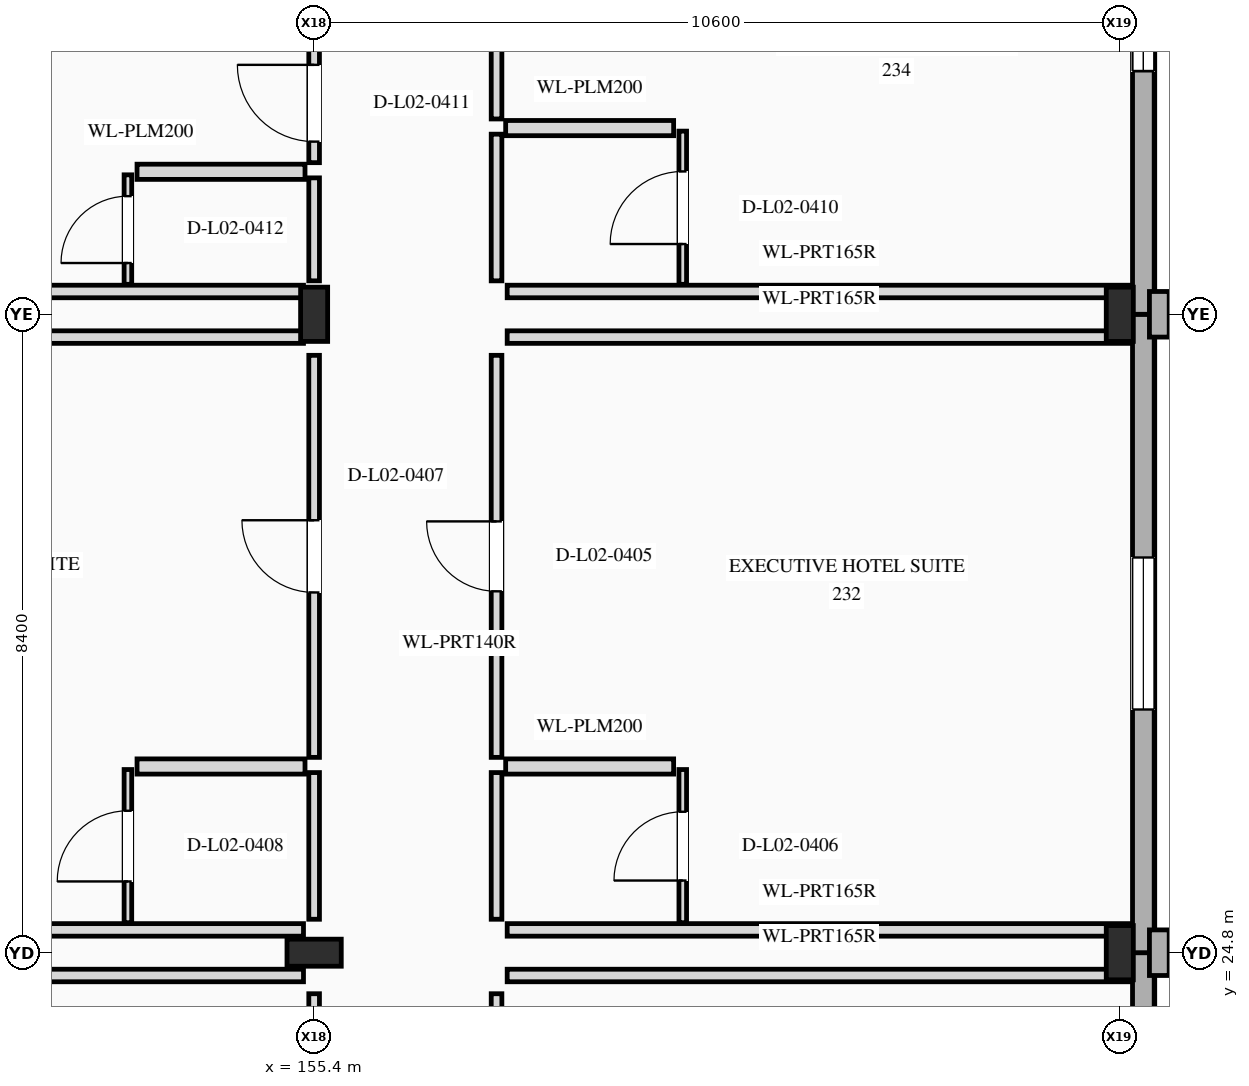
"""IFC4 building model, lengths in metres.
Left out: names, types, materials, properties, quantities, classifications, styles, units other than length and angle.
Written with IfcOpenShell. Run it as: python <this file> out.ifc"""

import sys

from ifc_helpers import new_model, si_unit, direction, frame, frame_2d, origin, origin_2d, place, context, subcontext, project, spatial, rectangle, i_section, extrude, element, fill, save


model = new_model("IFC4")
c1 = context("Model", 3, precision=1e-05, world=origin(), true_north=direction((0.0, 1.0)))
c2 = subcontext(c1, "Body", "Model", "MODEL_VIEW")
j1 = project(units=[si_unit("LENGTHUNIT", "METRE"), si_unit("PLANEANGLEUNIT", "RADIAN")], contexts=[c1])
p1 = place(None, origin())
s1 = spatial("IfcSite", under=j1, at=p1, CompositionType="ELEMENT")
p2 = place(p1, origin())
s2 = spatial("IfcBuilding", under=s1, at=p2, CompositionType="ELEMENT")
p3 = place(p2, frame((0.0, 0.0, 10.8)))
s3 = spatial("IfcBuildingStorey", under=s2, at=p3, CompositionType="ELEMENT", Elevation=10.8)
for number, where, z_axis, x_axis in (
    (1, (155.4, 24.8, 0.0), (0.0, 0.0, 1.0), (0.0, 1.0, 0.0)),
    (2, (155.4, 33.2, 0.0), (0.0, 0.0, 1.0), (1.0, 0.0, 0.0)),
    (3, (166.0, 24.8, 0.0), (0.0, 0.0, 1.0), (1.0, 0.0, 0.0)),
    (4, (166.0, 33.2, 0.0), (0.0, 0.0, 1.0), (1.0, 0.0, 0.0)),
):
    element("IfcColumn", number, at=place(p3, frame(where, z_axis=z_axis, x_axis=x_axis)), inside=s3, PredefinedType="COLUMN", context=c2, shape_type="SweptSolid", body=[
        extrude(i_section(OverallWidth=0.356, OverallDepth=0.714, WebThickness=0.019, FlangeThickness=0.034, at=origin_2d()), origin(), (0.0, 0.0, 1.0), 4.8),
    ])
p4 = place(p3, frame((166.31, 18.8, 0.0), z_axis=(0.0, 0.0, 1.0), x_axis=(0.0, 1.0, 0.0)))
e5 = element("IfcWall", 5, at=p4, inside=s3, PredefinedType="STANDARD", context=c2, shape_type="SweptSolid", body=[
    extrude(rectangle(XDim=6.0, YDim=0.285, at=frame_2d((3.0, 0.0))), origin(), (0.0, 0.0, 1.0), 4.8),
])
p5 = place(p4, frame((2.0, 0.0, 0.85)))
e6 = element("IfcOpeningElement", 6, at=p5, cuts=e5, PredefinedType="OPENING", context=c2, shape_type="SweptSolid", body=[
    extrude(rectangle(XDim=2.0, YDim=1.65, at=frame_2d((1.0, 0.825))), frame((0.0, 0.152, 0.0), z_axis=(0.0, -1.0, 0.0), x_axis=(1.0, 0.0, 0.0)), (0.0, 0.0, 1.0), 0.305),
])
p6 = place(p3, frame((166.31, 24.8, 0.0), z_axis=(0.0, 0.0, 1.0), x_axis=(0.0, 1.0, 0.0)))
e7 = element("IfcWall", 7, at=p6, inside=s3, PredefinedType="STANDARD", context=c2, shape_type="SweptSolid", body=[
    extrude(rectangle(XDim=8.4, YDim=0.285, at=frame_2d((4.2, 0.0))), origin(), (0.0, 0.0, 1.0), 4.8),
])
p7 = place(p6, frame((3.2, 0.0, 0.85)))
e8 = element("IfcOpeningElement", 8, at=p7, cuts=e7, PredefinedType="OPENING", context=c2, shape_type="SweptSolid", body=[
    extrude(rectangle(XDim=2.0, YDim=1.65, at=frame_2d((1.0, 0.825))), frame((0.0, 0.152, 0.0), z_axis=(0.0, -1.0, 0.0), x_axis=(1.0, 0.0, 0.0)), (0.0, 0.0, 1.0), 0.305),
])
p8 = place(p3, frame((166.52, 24.5, 0.0), z_axis=(0.0, 0.0, 1.0), x_axis=(0.0, 1.0, 0.0)))
e9 = element("IfcWall", 9, at=p8, inside=s3, PredefinedType="ELEMENTEDWALL", context=c2, shape_type="SweptSolid", body=[
    extrude(rectangle(XDim=0.6, YDim=0.26, at=frame_2d((0.3, 0.0))), origin(), (0.0, 0.0, 1.0), 4.8),
])
p9 = place(p3, frame((166.31, 33.2, 0.0), z_axis=(0.0, 0.0, 1.0), x_axis=(0.0, 1.0, 0.0)))
e10 = element("IfcWall", 10, at=p9, inside=s3, PredefinedType="STANDARD", context=c2, shape_type="SweptSolid", body=[
    extrude(rectangle(XDim=8.4, YDim=0.285, at=frame_2d((4.2, 0.0))), origin(), (0.0, 0.0, 1.0), 4.8),
])
p10 = place(p9, frame((3.2, 0.0, 0.85)))
e11 = element("IfcOpeningElement", 11, at=p10, cuts=e10, PredefinedType="OPENING", context=c2, shape_type="SweptSolid", body=[
    extrude(rectangle(XDim=2.0, YDim=1.65, at=frame_2d((1.0, 0.825))), frame((0.0, 0.152, 0.0), z_axis=(0.0, -1.0, 0.0), x_axis=(1.0, 0.0, 0.0)), (0.0, 0.0, 1.0), 0.305),
])
p11 = place(p3, frame((166.52, 32.9, 0.0), z_axis=(0.0, 0.0, 1.0), x_axis=(0.0, 1.0, 0.0)))
e12 = element("IfcWall", 12, at=p11, inside=s3, PredefinedType="ELEMENTEDWALL", context=c2, shape_type="SweptSolid", body=[
    extrude(rectangle(XDim=0.6, YDim=0.26, at=frame_2d((0.3, 0.0))), origin(), (0.0, 0.0, 1.0), 4.8),
])
p12 = place(p3, frame((157.8, 21.37, 0.0), z_axis=(0.0, 0.0, 1.0), x_axis=(0.0, 1.0, 0.0)))
e13 = element("IfcWall", 13, at=p12, inside=s3, PredefinedType="PARTITIONING", context=c2, shape_type="SweptSolid", body=[
    extrude(rectangle(XDim=2.89, YDim=0.14, at=frame_2d((1.445, 0.0))), origin(), (0.0, 0.0, 1.0), 4.033),
])
p13 = place(p12, frame((0.925, 0.0, 0.0)))
e14 = element("IfcOpeningElement", 14, at=p13, cuts=e13, PredefinedType="OPENING", context=c2, shape_type="SweptSolid", body=[
    extrude(rectangle(XDim=1.04, YDim=2.4, at=frame_2d((0.52, 1.2))), frame((0.0, 0.08, 0.0), z_axis=(0.0, -1.0, 0.0), x_axis=(1.0, 0.0, 0.0)), (0.0, 0.0, 1.0), 0.16),
])
p14 = place(p3, frame((157.94, 24.5, 0.0), z_axis=(0.0, 0.0, 1.0), x_axis=(1.0, 0.0, 0.0)))
e15 = element("IfcWall", 15, at=p14, inside=s3, PredefinedType="PARTITIONING", context=c2, shape_type="SweptSolid", body=[
    extrude(rectangle(XDim=8.213, YDim=0.165, at=frame_2d((4.106, 0.0))), origin(), (0.0, 0.0, 1.0), 3.865),
])
p15 = place(p3, frame((155.4, 21.37, 0.0), z_axis=(0.0, 0.0, 1.0), x_axis=(0.0, 1.0, 0.0)))
e16 = element("IfcWall", 16, at=p15, inside=s3, PredefinedType="PARTITIONING", context=c2, shape_type="SweptSolid", body=[
    extrude(rectangle(XDim=2.89, YDim=0.14, at=frame_2d((1.445, 0.0))), origin(), (0.0, 0.0, 1.0), 3.949),
])
p16 = place(p15, frame((0.91, 0.0, 0.0)))
e17 = element("IfcOpeningElement", 17, at=p16, cuts=e16, PredefinedType="OPENING", context=c2, shape_type="SweptSolid", body=[
    extrude(rectangle(XDim=1.07, YDim=2.4, at=frame_2d((0.535, 1.2))), frame((0.0, 0.08, 0.0), z_axis=(0.0, -1.0, 0.0), x_axis=(1.0, 0.0, 0.0)), (0.0, 0.0, 1.0), 0.16),
])
p17 = place(p3, frame((147.048, 24.5, 0.0), z_axis=(0.0, 0.0, 1.0), x_axis=(1.0, 0.0, 0.0)))
e18 = element("IfcWall", 18, at=p17, inside=s3, PredefinedType="PARTITIONING", context=c2, shape_type="SweptSolid", body=[
    extrude(rectangle(XDim=8.212, YDim=0.165, at=frame_2d((4.106, 0.0))), origin(), (0.0, 0.0, 1.0), 3.888),
])
p18 = place(p3, frame((157.8, 25.24, 0.0), z_axis=(0.0, 0.0, 1.0), x_axis=(0.0, 1.0, 0.0)))
e19 = element("IfcWall", 19, at=p18, inside=s3, PredefinedType="PARTITIONING", context=c2, shape_type="SweptSolid", body=[
    extrude(rectangle(XDim=1.93, YDim=0.14, at=frame_2d((0.965, 0.0))), origin(), (0.0, 0.0, 1.0), 4.028),
])
p19 = place(p3, frame((157.8, 27.37, 0.0), z_axis=(0.0, 0.0, 1.0), x_axis=(0.0, 1.0, 0.0)))
e20 = element("IfcWall", 20, at=p19, inside=s3, PredefinedType="PARTITIONING", context=c2, shape_type="SweptSolid", body=[
    extrude(rectangle(XDim=5.29, YDim=0.14, at=frame_2d((2.645, 0.0))), origin(), (0.0, 0.0, 1.0), 4.028),
])
p20 = place(p19, frame((2.185, 0.0, 0.0)))
e21 = element("IfcOpeningElement", 21, at=p20, cuts=e20, PredefinedType="OPENING", context=c2, shape_type="SweptSolid", body=[
    extrude(rectangle(XDim=0.92, YDim=2.15, at=frame_2d((0.46, 1.075))), frame((0.0, 0.08, 0.0), z_axis=(0.0, -1.0, 0.0), x_axis=(1.0, 0.0, 0.0)), (0.0, 0.0, 1.0), 0.16),
])
for number, where, z_axis, x_axis in (
    (22, (157.94, 25.1, 0.0), (0.0, 0.0, 1.0), (1.0, 0.0, 0.0)),
    (23, (157.94, 32.9, 0.0), (0.0, 0.0, 1.0), (1.0, 0.0, 0.0)),
):
    element("IfcWall", number, at=place(p3, frame(where, z_axis=z_axis, x_axis=x_axis)), inside=s3, PredefinedType="PARTITIONING", context=c2, shape_type="SweptSolid", body=[
        extrude(rectangle(XDim=8.213, YDim=0.165, at=frame_2d((4.106, 0.0))), origin(), (0.0, 0.0, 1.0), 3.865),
    ])
p21 = place(p3, frame((157.92, 27.25, 0.0), z_axis=(0.0, 0.0, 1.0), x_axis=(1.0, 0.0, 0.0)))
e24 = element("IfcWall", 24, at=p21, inside=s3, PredefinedType="PLUMBINGWALL", context=c2, shape_type="SweptSolid", body=[
    extrude(rectangle(XDim=2.21, YDim=0.2, at=frame_2d((1.105, 0.0))), origin(), (0.0, 0.0, 1.0), 4.475),
])
p22 = place(p3, frame((160.25, 25.195, 0.0), z_axis=(0.0, 0.0, 1.0), x_axis=(0.0, 1.0, 0.0)))
e25 = element("IfcWall", 25, at=p22, inside=s3, PredefinedType="PARTITIONING", context=c2, shape_type="SweptSolid", body=[
    extrude(rectangle(XDim=2.015, YDim=0.1, at=frame_2d((1.008, 0.0))), origin(), (0.0, 0.0, 1.0), 4.028),
])
p23 = place(p22, frame((0.555, 0.0, 0.0)))
e26 = element("IfcOpeningElement", 26, at=p23, cuts=e25, PredefinedType="OPENING", context=c2, shape_type="SweptSolid", body=[
    extrude(rectangle(XDim=0.905, YDim=2.1, at=frame_2d((0.453, 1.05))), frame((0.0, 0.06, 0.0), z_axis=(0.0, -1.0, 0.0), x_axis=(1.0, 0.0, 0.0)), (0.0, 0.0, 1.0), 0.12),
])
p24 = place(p3, frame((155.4, 25.24, 0.0), z_axis=(0.0, 0.0, 1.0), x_axis=(0.0, 1.0, 0.0)))
e27 = element("IfcWall", 27, at=p24, inside=s3, PredefinedType="PARTITIONING", context=c2, shape_type="SweptSolid", body=[
    extrude(rectangle(XDim=1.93, YDim=0.14, at=frame_2d((0.965, 0.0))), origin(), (0.0, 0.0, 1.0), 3.949),
])
p25 = place(p3, frame((155.4, 27.37, 0.0), z_axis=(0.0, 0.0, 1.0), x_axis=(0.0, 1.0, 0.0)))
e28 = element("IfcWall", 28, at=p25, inside=s3, PredefinedType="PARTITIONING", context=c2, shape_type="SweptSolid", body=[
    extrude(rectangle(XDim=5.29, YDim=0.14, at=frame_2d((2.645, 0.0))), origin(), (0.0, 0.0, 1.0), 3.949),
])
p26 = place(p25, frame((2.17, 0.0, 0.0)))
e29 = element("IfcOpeningElement", 29, at=p26, cuts=e28, PredefinedType="OPENING", context=c2, shape_type="SweptSolid", body=[
    extrude(rectangle(XDim=0.95, YDim=2.15, at=frame_2d((0.475, 1.075))), frame((0.0, 0.08, 0.0), z_axis=(0.0, -1.0, 0.0), x_axis=(1.0, 0.0, 0.0)), (0.0, 0.0, 1.0), 0.16),
])
for number, where, z_axis, x_axis in (
    (30, (147.048, 25.1, 0.0), (0.0, 0.0, 1.0), (1.0, 0.0, 0.0)),
    (31, (147.048, 32.9, 0.0), (0.0, 0.0, 1.0), (1.0, 0.0, 0.0)),
):
    element("IfcWall", number, at=place(p3, frame(where, z_axis=z_axis, x_axis=x_axis)), inside=s3, PredefinedType="PARTITIONING", context=c2, shape_type="SweptSolid", body=[
        extrude(rectangle(XDim=8.212, YDim=0.165, at=frame_2d((4.106, 0.0))), origin(), (0.0, 0.0, 1.0), 3.888),
    ])
p27 = place(p3, frame((153.07, 27.25, 0.0), z_axis=(0.0, 0.0, 1.0), x_axis=(1.0, 0.0, 0.0)))
e32 = element("IfcWall", 32, at=p27, inside=s3, PredefinedType="PLUMBINGWALL", context=c2, shape_type="SweptSolid", body=[
    extrude(rectangle(XDim=2.21, YDim=0.2, at=frame_2d((1.105, 0.0))), origin(), (0.0, 0.0, 1.0), 4.475),
])
p28 = place(p3, frame((152.95, 25.195, 0.0), z_axis=(0.0, 0.0, 1.0), x_axis=(0.0, 1.0, 0.0)))
e33 = element("IfcWall", 33, at=p28, inside=s3, PredefinedType="PARTITIONING", context=c2, shape_type="SweptSolid", body=[
    extrude(rectangle(XDim=2.015, YDim=0.1, at=frame_2d((1.008, 0.0))), origin(), (0.0, 0.0, 1.0), 4.083),
])
p29 = place(p28, frame((0.543, 0.0, 0.0)))
e34 = element("IfcOpeningElement", 34, at=p29, cuts=e33, PredefinedType="OPENING", context=c2, shape_type="SweptSolid", body=[
    extrude(rectangle(XDim=0.93, YDim=2.14, at=frame_2d((0.465, 1.07))), frame((0.0, 0.06, 0.0), z_axis=(0.0, -1.0, 0.0), x_axis=(1.0, 0.0, 0.0)), (0.0, 0.0, 1.0), 0.12),
])
p30 = place(p3, frame((157.8, 33.64, 0.0), z_axis=(0.0, 0.0, 1.0), x_axis=(0.0, 1.0, 0.0)))
e35 = element("IfcWall", 35, at=p30, inside=s3, PredefinedType="PARTITIONING", context=c2, shape_type="SweptSolid", body=[
    extrude(rectangle(XDim=1.93, YDim=0.14, at=frame_2d((0.965, 0.0))), origin(), (0.0, 0.0, 1.0), 4.475),
])
p31 = place(p3, frame((157.8, 35.77, 0.0), z_axis=(0.0, 0.0, 1.0), x_axis=(0.0, 1.0, 0.0)))
e36 = element("IfcWall", 36, at=p31, inside=s3, PredefinedType="PARTITIONING", context=c2, shape_type="SweptSolid", body=[
    extrude(rectangle(XDim=5.29, YDim=0.14, at=frame_2d((2.645, 0.0))), origin(), (0.0, 0.0, 1.0), 4.475),
])
p32 = place(p31, frame((2.155, 0.0, 0.0)))
e37 = element("IfcOpeningElement", 37, at=p32, cuts=e36, PredefinedType="OPENING", context=c2, shape_type="SweptSolid", body=[
    extrude(rectangle(XDim=0.98, YDim=2.2, at=frame_2d((0.49, 1.1))), frame((0.0, 0.08, 0.0), z_axis=(0.0, -1.0, 0.0), x_axis=(1.0, 0.0, 0.0)), (0.0, 0.0, 1.0), 0.16),
])
p33 = place(p3, frame((157.94, 33.5, 0.0), z_axis=(0.0, 0.0, 1.0), x_axis=(1.0, 0.0, 0.0)))
e38 = element("IfcWall", 38, at=p33, inside=s3, PredefinedType="PARTITIONING", context=c2, shape_type="SweptSolid", body=[
    extrude(rectangle(XDim=8.213, YDim=0.165, at=frame_2d((4.106, 0.0))), origin(), (0.0, 0.0, 1.0), 3.865),
])
p34 = place(p3, frame((157.92, 35.65, 0.0), z_axis=(0.0, 0.0, 1.0), x_axis=(1.0, 0.0, 0.0)))
e39 = element("IfcWall", 39, at=p34, inside=s3, PredefinedType="PLUMBINGWALL", context=c2, shape_type="SweptSolid", body=[
    extrude(rectangle(XDim=2.21, YDim=0.2, at=frame_2d((1.105, 0.0))), origin(), (0.0, 0.0, 1.0), 4.475),
])
p35 = place(p3, frame((160.25, 33.594, 0.0), z_axis=(0.0, 0.0, 1.0), x_axis=(0.0, 1.0, 0.0)))
e40 = element("IfcWall", 40, at=p35, inside=s3, PredefinedType="PARTITIONING", context=c2, shape_type="SweptSolid", body=[
    extrude(rectangle(XDim=2.016, YDim=0.1, at=frame_2d((1.008, 0.0))), origin(), (0.0, 0.0, 1.0), 4.475),
])
p36 = place(p35, frame((0.53, 0.0, 0.0)))
e41 = element("IfcOpeningElement", 41, at=p36, cuts=e40, PredefinedType="OPENING", context=c2, shape_type="SweptSolid", body=[
    extrude(rectangle(XDim=0.955, YDim=2.14, at=frame_2d((0.478, 1.07))), frame((0.0, 0.06, 0.0), z_axis=(0.0, -1.0, 0.0), x_axis=(1.0, 0.0, 0.0)), (0.0, 0.0, 1.0), 0.12),
])
p37 = place(p3, frame((155.4, 33.64, 0.0), z_axis=(0.0, 0.0, 1.0), x_axis=(0.0, 1.0, 0.0)))
e42 = element("IfcWall", 42, at=p37, inside=s3, PredefinedType="PARTITIONING", context=c2, shape_type="SweptSolid", body=[
    extrude(rectangle(XDim=1.355, YDim=0.14, at=frame_2d((0.678, 0.0))), origin(), (0.0, 0.0, 1.0), 3.865),
])
p38 = place(p3, frame((155.4, 35.195, 0.0), z_axis=(0.0, 0.0, 1.0), x_axis=(0.0, 1.0, 0.0)))
e43 = element("IfcWall", 43, at=p38, inside=s3, PredefinedType="PARTITIONING", context=c2, shape_type="SweptSolid", body=[
    extrude(rectangle(XDim=1.565, YDim=0.14, at=frame_2d((0.782, 0.0))), origin(), (0.0, 0.0, 1.0), 3.865),
])
p39 = place(p38, frame((0.277, 0.0, 0.0)))
e44 = element("IfcOpeningElement", 44, at=p39, cuts=e43, PredefinedType="OPENING", context=c2, shape_type="SweptSolid", body=[
    extrude(rectangle(XDim=1.01, YDim=2.2, at=frame_2d((0.505, 1.1))), frame((0.0, 0.08, 0.0), z_axis=(0.0, -1.0, 0.0), x_axis=(1.0, 0.0, 0.0)), (0.0, 0.0, 1.0), 0.16),
])
p40 = place(p3, frame((147.048, 33.5, 0.0), z_axis=(0.0, 0.0, 1.0), x_axis=(1.0, 0.0, 0.0)))
e45 = element("IfcWall", 45, at=p40, inside=s3, PredefinedType="PARTITIONING", context=c2, shape_type="SweptSolid", body=[
    extrude(rectangle(XDim=8.212, YDim=0.165, at=frame_2d((4.106, 0.0))), origin(), (0.0, 0.0, 1.0), 3.888),
])
p41 = place(p3, frame((153.07, 35.075, 0.0), z_axis=(0.0, 0.0, 1.0), x_axis=(1.0, 0.0, 0.0)))
e46 = element("IfcWall", 46, at=p41, inside=s3, PredefinedType="PLUMBINGWALL", context=c2, shape_type="SweptSolid", body=[
    extrude(rectangle(XDim=2.21, YDim=0.2, at=frame_2d((1.105, 0.0))), origin(), (0.0, 0.0, 1.0), 4.475),
])
p42 = place(p3, frame((152.95, 33.594, 0.0), z_axis=(0.0, 0.0, 1.0), x_axis=(0.0, 1.0, 0.0)))
e47 = element("IfcWall", 47, at=p42, inside=s3, PredefinedType="PARTITIONING", context=c2, shape_type="SweptSolid", body=[
    extrude(rectangle(XDim=1.44, YDim=0.1, at=frame_2d((0.72, 0.0))), origin(), (0.0, 0.0, 1.0), 4.475),
])
p43 = place(p42, frame((0.28, 0.0, 0.0)))
e48 = element("IfcOpeningElement", 48, at=p43, cuts=e47, PredefinedType="OPENING", context=c2, shape_type="SweptSolid", body=[
    extrude(rectangle(XDim=0.88, YDim=2.18, at=frame_2d((0.44, 1.09))), frame((0.0, 0.06, 0.0), z_axis=(0.0, -1.0, 0.0), x_axis=(1.0, 0.0, 0.0)), (0.0, 0.0, 1.0), 0.12),
])
p44 = place(p7, origin())
e49 = element("IfcWindow", 49, at=p44, inside=s3, PartitioningType="SINGLE_PANEL", PredefinedType="WINDOW", context=c2, shape_type="SweptSolid", body=[
    extrude(rectangle(XDim=2.0, YDim=1.65, at=frame_2d((1.0, 0.825))), frame((0.0, 0.03, 0.0), z_axis=(0.0, -1.0, 0.0), x_axis=(1.0, 0.0, 0.0)), (0.0, 0.0, 1.0), 0.06),
])
fill(e8, e49)
p45 = place(p10, origin())
e50 = element("IfcWindow", 50, at=p45, inside=s3, PartitioningType="SINGLE_PANEL", PredefinedType="WINDOW", context=c2, shape_type="SweptSolid", body=[
    extrude(rectangle(XDim=2.0, YDim=1.65, at=frame_2d((1.0, 0.825))), frame((0.0, 0.03, 0.0), z_axis=(0.0, -1.0, 0.0), x_axis=(1.0, 0.0, 0.0)), (0.0, 0.0, 1.0), 0.06),
])
fill(e11, e50)
p46 = place(p20, origin())
e51 = element("IfcDoor", 51, at=p46, inside=s3, OperationType="SINGLE_SWING_RIGHT", PredefinedType="DOOR", context=c2, shape_type="SweptSolid", body=[
    extrude(rectangle(XDim=0.92, YDim=2.15, at=frame_2d((0.46, 1.075))), frame((0.0, 0.025, 0.0), z_axis=(0.0, -1.0, 0.0), x_axis=(1.0, 0.0, 0.0)), (0.0, 0.0, 1.0), 0.05),
])
fill(e21, e51)
p47 = place(p23, origin())
e52 = element("IfcDoor", 52, at=p47, inside=s3, OperationType="SINGLE_SWING_LEFT", PredefinedType="DOOR", context=c2, shape_type="SweptSolid", body=[
    extrude(rectangle(XDim=0.905, YDim=2.1, at=frame_2d((0.453, 1.05))), frame((0.0, 0.025, 0.0), z_axis=(0.0, -1.0, 0.0), x_axis=(1.0, 0.0, 0.0)), (0.0, 0.0, 1.0), 0.05),
])
fill(e26, e52)
p48 = place(p26, origin())
e53 = element("IfcDoor", 53, at=p48, inside=s3, OperationType="SINGLE_SWING_RIGHT", PredefinedType="DOOR", context=c2, shape_type="SweptSolid", body=[
    extrude(rectangle(XDim=0.95, YDim=2.15, at=frame_2d((0.475, 1.075))), frame((0.0, 0.025, 0.0), z_axis=(0.0, -1.0, 0.0), x_axis=(1.0, 0.0, 0.0)), (0.0, 0.0, 1.0), 0.05),
])
fill(e29, e53)
p49 = place(p29, origin())
e54 = element("IfcDoor", 54, at=p49, inside=s3, OperationType="SINGLE_SWING_LEFT", PredefinedType="DOOR", context=c2, shape_type="SweptSolid", body=[
    extrude(rectangle(XDim=0.93, YDim=2.14, at=frame_2d((0.465, 1.07))), frame((0.0, 0.025, 0.0), z_axis=(0.0, -1.0, 0.0), x_axis=(1.0, 0.0, 0.0)), (0.0, 0.0, 1.0), 0.05),
])
fill(e34, e54)
p50 = place(p36, origin())
e55 = element("IfcDoor", 55, at=p50, inside=s3, OperationType="SINGLE_SWING_LEFT", PredefinedType="DOOR", context=c2, shape_type="SweptSolid", body=[
    extrude(rectangle(XDim=0.955, YDim=2.14, at=frame_2d((0.478, 1.07))), frame((0.0, 0.025, 0.0), z_axis=(0.0, -1.0, 0.0), x_axis=(1.0, 0.0, 0.0)), (0.0, 0.0, 1.0), 0.05),
])
fill(e41, e55)
p51 = place(p39, origin())
e56 = element("IfcDoor", 56, at=p51, inside=s3, OperationType="SINGLE_SWING_RIGHT", PredefinedType="DOOR", context=c2, shape_type="SweptSolid", body=[
    extrude(rectangle(XDim=1.01, YDim=2.2, at=frame_2d((0.505, 1.1))), frame((0.0, 0.025, 0.0), z_axis=(0.0, -1.0, 0.0), x_axis=(1.0, 0.0, 0.0)), (0.0, 0.0, 1.0), 0.05),
])
fill(e44, e56)
p52 = place(p43, origin())
e57 = element("IfcDoor", 57, at=p52, inside=s3, OperationType="SINGLE_SWING_LEFT", PredefinedType="DOOR", context=c2, shape_type="SweptSolid", body=[
    extrude(rectangle(XDim=0.88, YDim=2.18, at=frame_2d((0.44, 1.09))), frame((0.0, 0.025, 0.0), z_axis=(0.0, -1.0, 0.0), x_axis=(1.0, 0.0, 0.0)), (0.0, 0.0, 1.0), 0.05),
])
fill(e48, e57)
save(model, sys.argv[1])
